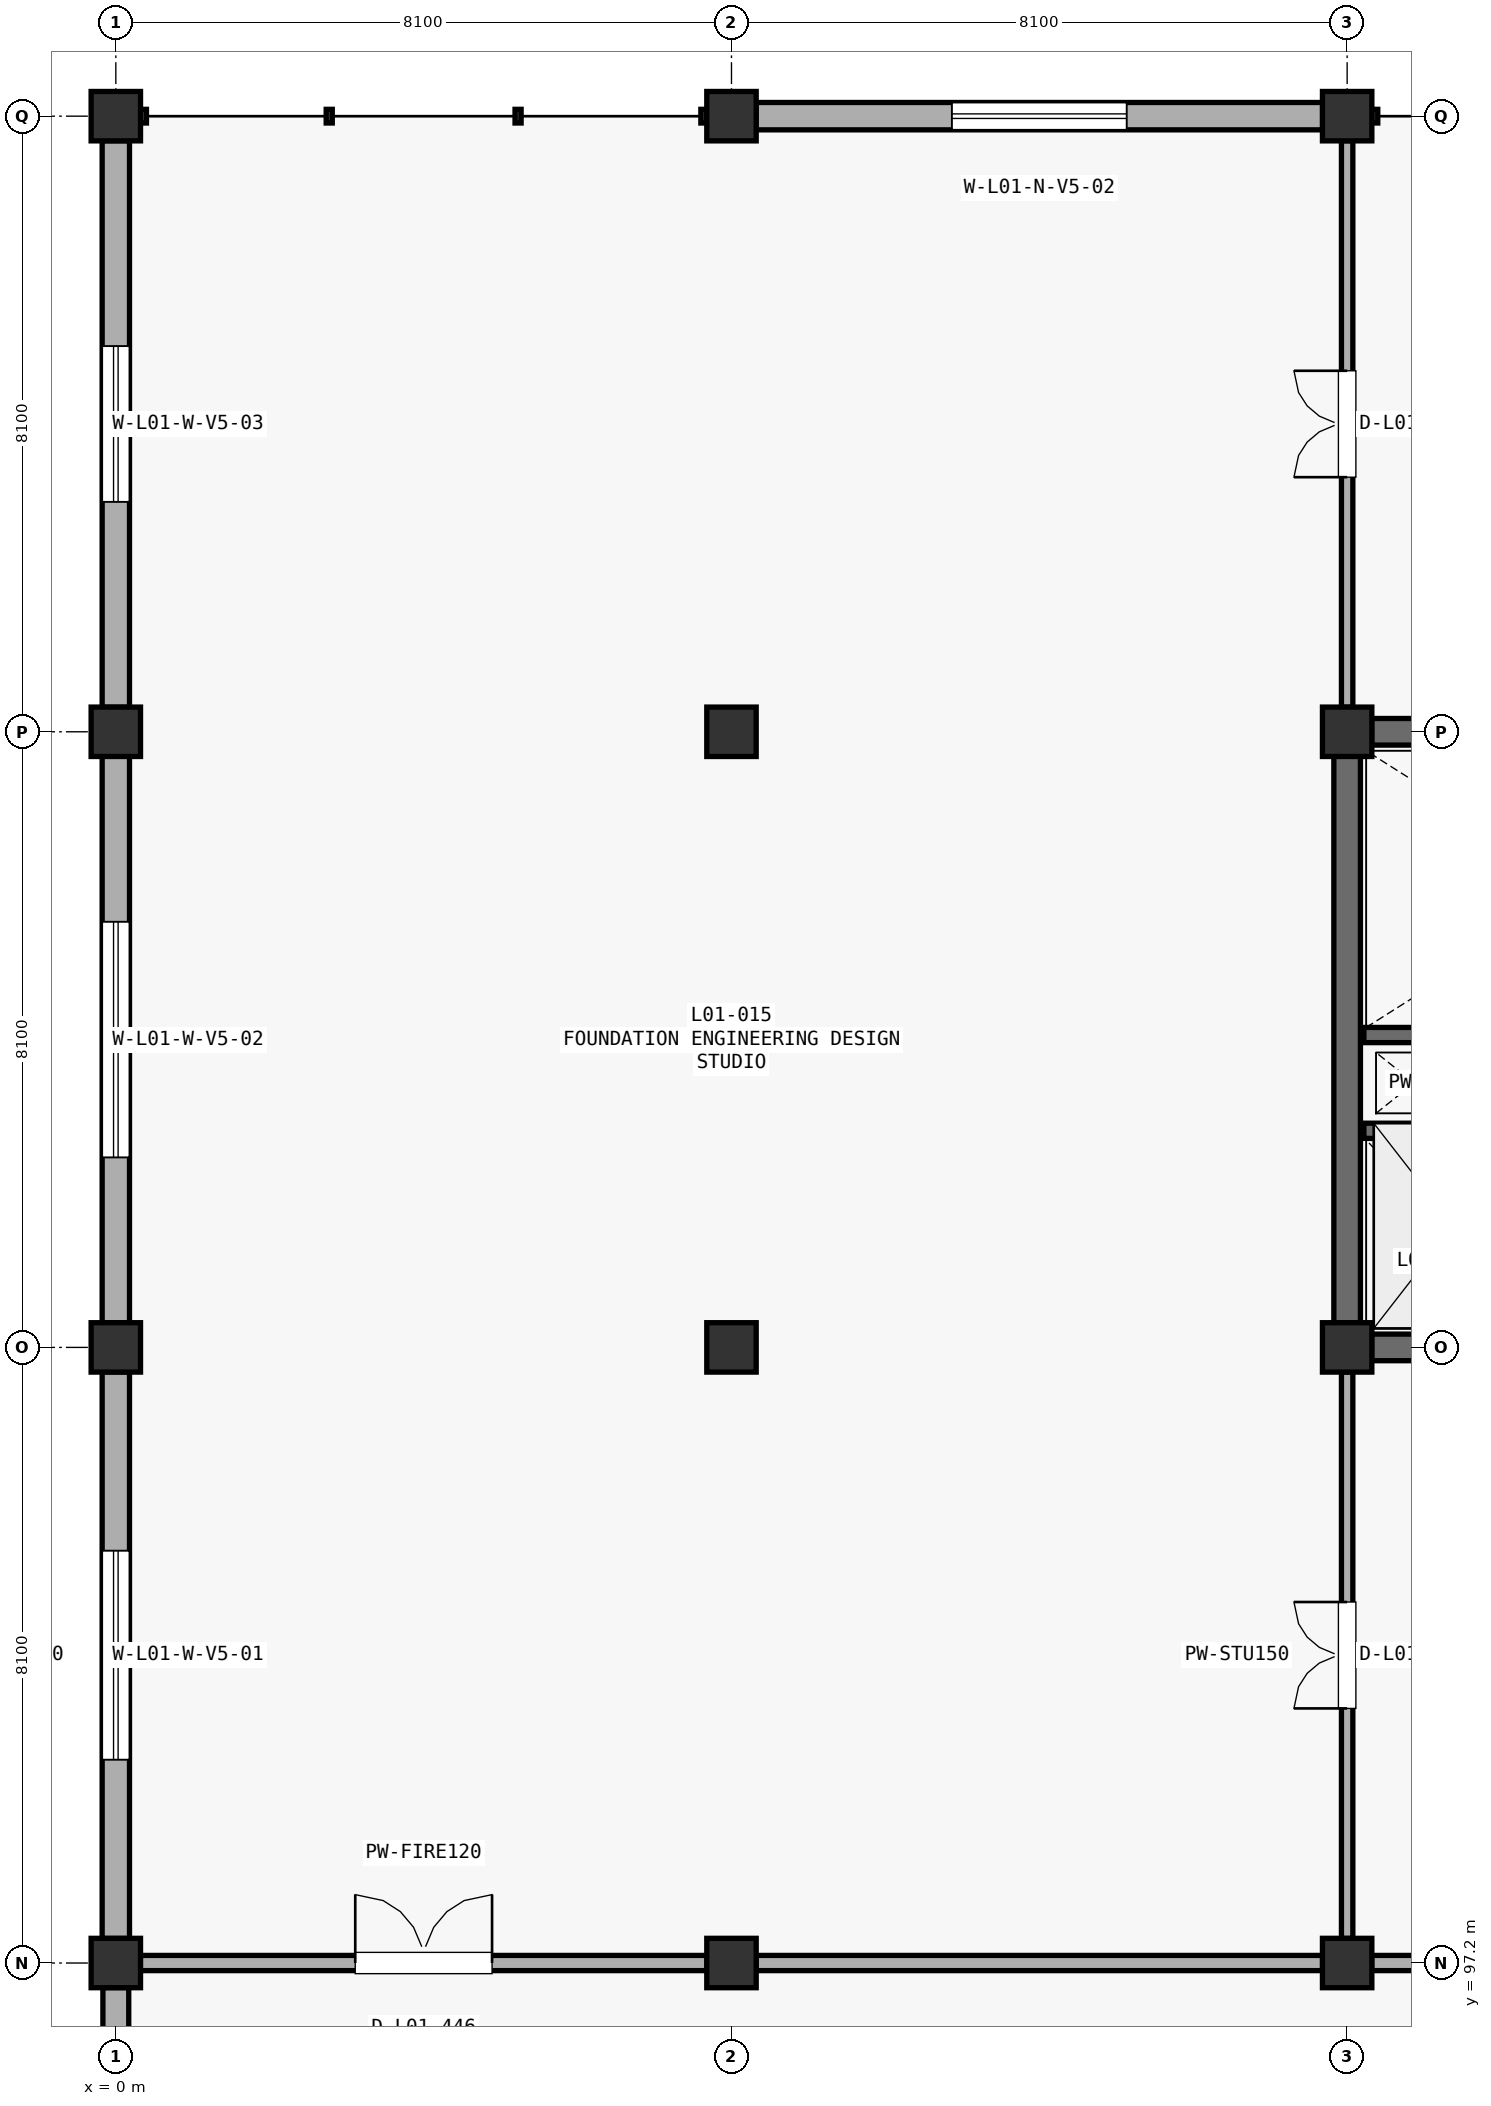
"""IFC4 building model, lengths in metres.
Left out: names, types, materials, properties, quantities, classifications, styles, units other than length and angle.
Written with IfcOpenShell. Run it as: python <this file> out.ifc"""

import sys

from ifc_helpers import new_model, si_unit, direction, frame, frame_2d, origin, origin_2d, place, context, subcontext, project, spatial, rectangle, extrude, element, fill, save


model = new_model("IFC4")
c1 = context("Model", 3, precision=1e-05, world=origin(), true_north=direction((0.0, 1.0)))
c2 = subcontext(c1, "Body", "Model", "MODEL_VIEW")
j1 = project(units=[si_unit("LENGTHUNIT", "METRE"), si_unit("PLANEANGLEUNIT", "RADIAN")], contexts=[c1])
p1 = place(None, origin())
s1 = spatial("IfcSite", under=j1, at=p1, CompositionType="ELEMENT")
p2 = place(p1, origin())
s2 = spatial("IfcBuilding", under=s1, at=p2, CompositionType="ELEMENT")
p3 = place(p2, frame((0.0, 0.0, 5.1)))
s3 = spatial("IfcBuildingStorey", under=s2, at=p3, CompositionType="ELEMENT", Elevation=5.1)
for number, where, z_axis, x_axis in (
    (1, (0.0, 97.2, 0.0), (0.0, 0.0, 1.0), (1.0, 0.0, 0.0)),
    (2, (0.0, 105.3, 0.0), (0.0, 0.0, 1.0), (1.0, 0.0, 0.0)),
    (3, (0.0, 113.4, 0.0), (0.0, 0.0, 1.0), (1.0, 0.0, 0.0)),
    (4, (0.0, 121.5, 0.0), (0.0, 0.0, 1.0), (1.0, 0.0, 0.0)),
    (5, (8.1, 97.2, 0.0), (0.0, 0.0, 1.0), (1.0, 0.0, 0.0)),
    (6, (8.1, 105.3, 0.0), (0.0, 0.0, 1.0), (1.0, 0.0, 0.0)),
    (7, (8.1, 113.4, 0.0), (0.0, 0.0, 1.0), (1.0, 0.0, 0.0)),
    (8, (8.1, 121.5, 0.0), (0.0, 0.0, 1.0), (1.0, 0.0, 0.0)),
    (9, (16.2, 97.2, 0.0), (0.0, 0.0, 1.0), (1.0, 0.0, 0.0)),
    (10, (16.2, 105.3, 0.0), (0.0, 0.0, 1.0), (1.0, 0.0, 0.0)),
    (11, (16.2, 113.4, 0.0), (0.0, 0.0, 1.0), (1.0, 0.0, 0.0)),
    (12, (16.2, 121.5, 0.0), (0.0, 0.0, 1.0), (1.0, 0.0, 0.0)),
):
    element("IfcColumn", number, at=place(p3, frame(where, z_axis=z_axis, x_axis=x_axis)), inside=s3, PredefinedType="COLUMN", context=c2, shape_type="SweptSolid", body=[
        extrude(rectangle(XDim=0.65, YDim=0.65, at=origin_2d()), origin(), (0.0, 0.0, 1.0), 4.59),
    ])
p4 = place(p3, frame((0.0, 89.323, 0.0), z_axis=(0.0, 0.0, 1.0), x_axis=(0.0, 1.0, 0.0)))
e13 = element("IfcWall", 13, at=p4, inside=s3, PredefinedType="STANDARD", context=c2, shape_type="SweptSolid", body=[
    extrude(rectangle(XDim=7.554, YDim=0.34, at=frame_2d((3.777, 0.0))), origin(), (0.0, 0.0, 1.0), 3.852),
])
p5 = place(p4, frame((2.727, 0.0, 1.25)))
e14 = element("IfcOpeningElement", 14, at=p5, cuts=e13, PredefinedType="OPENING", context=c2, shape_type="SweptSolid", body=[
    extrude(rectangle(XDim=2.1, YDim=1.5, at=frame_2d((1.05, 0.75))), frame((0.0, 0.18, 0.0), z_axis=(0.0, -1.0, 0.0), x_axis=(1.0, 0.0, 0.0)), (0.0, 0.0, 1.0), 0.36),
])
p6 = place(p3, frame((0.0, 97.523, 0.0), z_axis=(0.0, 0.0, 1.0), x_axis=(0.0, 1.0, 0.0)))
e15 = element("IfcWall", 15, at=p6, inside=s3, PredefinedType="STANDARD", context=c2, shape_type="SweptSolid", body=[
    extrude(rectangle(XDim=7.454, YDim=0.36, at=frame_2d((3.727, 0.0))), origin(), (0.0, 0.0, 1.0), 3.947),
])
p7 = place(p6, frame((2.352, 0.0, 0.85)))
e16 = element("IfcOpeningElement", 16, at=p7, cuts=e15, PredefinedType="OPENING", context=c2, shape_type="SweptSolid", body=[
    extrude(rectangle(XDim=2.75, YDim=1.7, at=frame_2d((1.375, 0.85))), frame((0.0, 0.19, 0.0), z_axis=(0.0, -1.0, 0.0), x_axis=(1.0, 0.0, 0.0)), (0.0, 0.0, 1.0), 0.38),
])
p8 = place(p3, frame((0.0, 105.623, 0.0), z_axis=(0.0, 0.0, 1.0), x_axis=(0.0, 1.0, 0.0)))
e17 = element("IfcWall", 17, at=p8, inside=s3, PredefinedType="STANDARD", context=c2, shape_type="SweptSolid", body=[
    extrude(rectangle(XDim=7.454, YDim=0.36, at=frame_2d((3.727, 0.0))), origin(), (0.0, 0.0, 1.0), 3.502),
])
p9 = place(p8, frame((2.177, 0.0, 0.85)))
e18 = element("IfcOpeningElement", 18, at=p9, cuts=e17, PredefinedType="OPENING", context=c2, shape_type="SweptSolid", body=[
    extrude(rectangle(XDim=3.1, YDim=1.7, at=frame_2d((1.55, 0.85))), frame((0.0, 0.19, 0.0), z_axis=(0.0, -1.0, 0.0), x_axis=(1.0, 0.0, 0.0)), (0.0, 0.0, 1.0), 0.38),
])
p10 = place(p3, frame((0.0, 113.723, 0.0), z_axis=(0.0, 0.0, 1.0), x_axis=(0.0, 1.0, 0.0)))
e19 = element("IfcWall", 19, at=p10, inside=s3, PredefinedType="STANDARD", context=c2, shape_type="SweptSolid", body=[
    extrude(rectangle(XDim=7.454, YDim=0.36, at=frame_2d((3.727, 0.0))), origin(), (0.0, 0.0, 1.0), 3.602),
])
p11 = place(p10, frame((2.702, 0.0, 0.85)))
e20 = element("IfcOpeningElement", 20, at=p11, cuts=e19, PredefinedType="OPENING", context=c2, shape_type="SweptSolid", body=[
    extrude(rectangle(XDim=2.05, YDim=1.6, at=frame_2d((1.025, 0.8))), frame((0.0, 0.19, 0.0), z_axis=(0.0, -1.0, 0.0), x_axis=(1.0, 0.0, 0.0)), (0.0, 0.0, 1.0), 0.38),
])
p12 = place(p3, frame((8.423, 121.5, 0.0), z_axis=(0.0, 0.0, 1.0), x_axis=(1.0, 0.0, 0.0)))
e21 = element("IfcWall", 21, at=p12, inside=s3, PredefinedType="STANDARD", context=c2, shape_type="SweptSolid", body=[
    extrude(rectangle(XDim=7.454, YDim=0.36, at=frame_2d((3.727, 0.0))), origin(), (0.0, 0.0, 1.0), 3.402),
])
p13 = place(p12, frame((2.577, 0.0, 0.85)))
e22 = element("IfcOpeningElement", 22, at=p13, cuts=e21, PredefinedType="OPENING", context=c2, shape_type="SweptSolid", body=[
    extrude(rectangle(XDim=2.3, YDim=1.6, at=frame_2d((1.15, 0.8))), frame((0.0, 0.19, 0.0), z_axis=(0.0, -1.0, 0.0), x_axis=(1.0, 0.0, 0.0)), (0.0, 0.0, 1.0), 0.38),
])
p14 = place(p3, frame((16.523, 113.4, 0.0), z_axis=(0.0, 0.0, 1.0), x_axis=(1.0, 0.0, 0.0)))
e23 = element("IfcWall", 23, at=p14, inside=s3, PredefinedType="SHEAR", context=c2, shape_type="SweptSolid", body=[
    extrude(rectangle(XDim=7.454, YDim=0.35, at=frame_2d((3.727, 0.0))), origin(), (0.0, 0.0, 1.0), 4.252),
])
p15 = place(p3, frame((16.2, 105.623, 0.0), z_axis=(0.0, 0.0, 1.0), x_axis=(0.0, 1.0, 0.0)))
e24 = element("IfcWall", 24, at=p15, inside=s3, PredefinedType="SHEAR", context=c2, shape_type="SweptSolid", body=[
    extrude(rectangle(XDim=7.454, YDim=0.35, at=frame_2d((3.727, 0.0))), origin(), (0.0, 0.0, 1.0), 4.252),
])
p16 = place(p3, frame((16.523, 105.3, 0.0), z_axis=(0.0, 0.0, 1.0), x_axis=(1.0, 0.0, 0.0)))
e25 = element("IfcWall", 25, at=p16, inside=s3, PredefinedType="SHEAR", context=c2, shape_type="SweptSolid", body=[
    extrude(rectangle(XDim=7.454, YDim=0.35, at=frame_2d((3.727, 0.0))), origin(), (0.0, 0.0, 1.0), 4.252),
])
p17 = place(p16, frame((5.204, 0.0, 0.0)))
e26 = element("IfcOpeningElement", 26, at=p17, cuts=e25, PredefinedType="OPENING", context=c2, shape_type="SweptSolid", body=[
    extrude(rectangle(XDim=1.2, YDim=2.2, at=frame_2d((0.6, 1.1))), frame((0.0, 0.185, 0.0), z_axis=(0.0, -1.0, 0.0), x_axis=(1.0, 0.0, 0.0)), (0.0, 0.0, 1.0), 0.37),
])
p18 = place(p3, frame((16.42, 109.41, 0.0), z_axis=(0.0, 0.0, 1.0), x_axis=(1.0, 0.0, 0.0)))
e27 = element("IfcWall", 27, at=p18, inside=s3, PredefinedType="SHEAR", context=c2, shape_type="SweptSolid", body=[
    extrude(rectangle(XDim=7.66, YDim=0.2, at=frame_2d((3.83, 0.0))), origin(), (0.0, 0.0, 1.0), 4.252),
])
p19 = place(p18, frame((6.11, 0.0, 0.0)))
e28 = element("IfcOpeningElement", 28, at=p19, cuts=e27, PredefinedType="OPENING", context=c2, shape_type="SweptSolid", body=[
    extrude(rectangle(XDim=1.15, YDim=2.2, at=frame_2d((0.575, 1.1))), frame((0.0, 0.11, 0.0), z_axis=(0.0, -1.0, 0.0), x_axis=(1.0, 0.0, 0.0)), (0.0, 0.0, 1.0), 0.22),
])
p20 = place(p3, frame((16.42, 108.15, 0.0), z_axis=(0.0, 0.0, 1.0), x_axis=(1.0, 0.0, 0.0)))
e29 = element("IfcWall", 29, at=p20, inside=s3, PredefinedType="SHEAR", context=c2, shape_type="SweptSolid", body=[
    extrude(rectangle(XDim=2.56, YDim=0.2, at=frame_2d((1.28, 0.0))), origin(), (0.0, 0.0, 1.0), 4.252),
])
p21 = place(p3, frame((0.323, 97.2, 0.0), z_axis=(0.0, 0.0, 1.0), x_axis=(1.0, 0.0, 0.0)))
e30 = element("IfcWall", 30, at=p21, inside=s3, PredefinedType="PARTITIONING", context=c2, shape_type="SweptSolid", body=[
    extrude(rectangle(XDim=7.454, YDim=0.2, at=frame_2d((3.727, 0.0))), origin(), (0.0, 0.0, 1.0), 3.302),
])
p22 = place(p21, frame((2.827, 0.0, 0.0)))
e31 = element("IfcOpeningElement", 31, at=p22, cuts=e30, PredefinedType="OPENING", context=c2, shape_type="SweptSolid", body=[
    extrude(rectangle(XDim=1.8, YDim=2.4, at=frame_2d((0.9, 1.2))), frame((0.0, 0.11, 0.0), z_axis=(0.0, -1.0, 0.0), x_axis=(1.0, 0.0, 0.0)), (0.0, 0.0, 1.0), 0.22),
])
p23 = place(p3, frame((8.423, 97.2, 0.0), z_axis=(0.0, 0.0, 1.0), x_axis=(1.0, 0.0, 0.0)))
e32 = element("IfcWall", 32, at=p23, inside=s3, PredefinedType="PARTITIONING", context=c2, shape_type="SweptSolid", body=[
    extrude(rectangle(XDim=7.454, YDim=0.2, at=frame_2d((3.727, 0.0))), origin(), (0.0, 0.0, 1.0), 3.502),
])
p24 = place(p3, frame((16.523, 97.2, 0.0), z_axis=(0.0, 0.0, 1.0), x_axis=(1.0, 0.0, 0.0)))
e33 = element("IfcWall", 33, at=p24, inside=s3, PredefinedType="PARTITIONING", context=c2, shape_type="SweptSolid", body=[
    extrude(rectangle(XDim=7.454, YDim=0.2, at=frame_2d((3.727, 0.0))), origin(), (0.0, 0.0, 1.0), 3.602),
])
p25 = place(p3, frame((16.2, 97.523, 0.0), z_axis=(0.0, 0.0, 1.0), x_axis=(0.0, 1.0, 0.0)))
e34 = element("IfcWall", 34, at=p25, inside=s3, PredefinedType="PARTITIONING", context=c2, shape_type="SweptSolid", body=[
    extrude(rectangle(XDim=7.454, YDim=0.15, at=frame_2d((3.727, 0.0))), origin(), (0.0, 0.0, 1.0), 3.402),
])
p26 = place(p25, frame((3.027, 0.0, 0.0)))
e35 = element("IfcOpeningElement", 35, at=p26, cuts=e34, PredefinedType="OPENING", context=c2, shape_type="SweptSolid", body=[
    extrude(rectangle(XDim=1.4, YDim=2.2, at=frame_2d((0.7, 1.1))), frame((0.0, 0.085, 0.0), z_axis=(0.0, -1.0, 0.0), x_axis=(1.0, 0.0, 0.0)), (0.0, 0.0, 1.0), 0.17),
])
p27 = place(p3, frame((16.2, 113.723, 0.0), z_axis=(0.0, 0.0, 1.0), x_axis=(0.0, 1.0, 0.0)))
e36 = element("IfcWall", 36, at=p27, inside=s3, PredefinedType="PARTITIONING", context=c2, shape_type="SweptSolid", body=[
    extrude(rectangle(XDim=7.454, YDim=0.15, at=frame_2d((3.727, 0.0))), origin(), (0.0, 0.0, 1.0), 3.502),
])
p28 = place(p27, frame((3.027, 0.0, 0.0)))
e37 = element("IfcOpeningElement", 37, at=p28, cuts=e36, PredefinedType="OPENING", context=c2, shape_type="SweptSolid", body=[
    extrude(rectangle(XDim=1.4, YDim=2.2, at=frame_2d((0.7, 1.1))), frame((0.0, 0.085, 0.0), z_axis=(0.0, -1.0, 0.0), x_axis=(1.0, 0.0, 0.0)), (0.0, 0.0, 1.0), 0.17),
])
p29 = place(p7, origin())
e38 = element("IfcWindow", 38, at=p29, inside=s3, PartitioningType="SINGLE_PANEL", PredefinedType="WINDOW", context=c2, shape_type="SweptSolid", body=[
    extrude(rectangle(XDim=2.75, YDim=1.7, at=frame_2d((1.375, 0.85))), frame((0.0, 0.03, 0.0), z_axis=(0.0, -1.0, 0.0), x_axis=(1.0, 0.0, 0.0)), (0.0, 0.0, 1.0), 0.06),
])
fill(e16, e38)
p30 = place(p9, origin())
e39 = element("IfcWindow", 39, at=p30, inside=s3, PartitioningType="SINGLE_PANEL", PredefinedType="WINDOW", context=c2, shape_type="SweptSolid", body=[
    extrude(rectangle(XDim=3.1, YDim=1.7, at=frame_2d((1.55, 0.85))), frame((0.0, 0.03, 0.0), z_axis=(0.0, -1.0, 0.0), x_axis=(1.0, 0.0, 0.0)), (0.0, 0.0, 1.0), 0.06),
])
fill(e18, e39)
p31 = place(p11, origin())
e40 = element("IfcWindow", 40, at=p31, inside=s3, PartitioningType="SINGLE_PANEL", PredefinedType="WINDOW", context=c2, shape_type="SweptSolid", body=[
    extrude(rectangle(XDim=2.05, YDim=1.6, at=frame_2d((1.025, 0.8))), frame((0.0, 0.03, 0.0), z_axis=(0.0, -1.0, 0.0), x_axis=(1.0, 0.0, 0.0)), (0.0, 0.0, 1.0), 0.06),
])
fill(e20, e40)
p32 = place(p13, origin())
e41 = element("IfcWindow", 41, at=p32, inside=s3, PartitioningType="SINGLE_PANEL", PredefinedType="WINDOW", context=c2, shape_type="SweptSolid", body=[
    extrude(rectangle(XDim=2.3, YDim=1.6, at=frame_2d((1.15, 0.8))), frame((0.0, 0.03, 0.0), z_axis=(0.0, -1.0, 0.0), x_axis=(1.0, 0.0, 0.0)), (0.0, 0.0, 1.0), 0.06),
])
fill(e22, e41)
p33 = place(p22, origin())
e42 = element("IfcDoor", 42, at=p33, inside=s3, OperationType="DOUBLE_SWING_LEFT", PredefinedType="DOOR", context=c2, shape_type="SweptSolid", body=[
    extrude(rectangle(XDim=1.8, YDim=2.4, at=frame_2d((0.9, 1.2))), frame((0.0, 0.025, 0.0), z_axis=(0.0, -1.0, 0.0), x_axis=(1.0, 0.0, 0.0)), (0.0, 0.0, 1.0), 0.05),
])
fill(e31, e42)
p34 = place(p26, origin())
e43 = element("IfcDoor", 43, at=p34, inside=s3, OperationType="DOUBLE_SWING_LEFT", PredefinedType="DOOR", context=c2, shape_type="SweptSolid", body=[
    extrude(rectangle(XDim=1.4, YDim=2.2, at=frame_2d((0.7, 1.1))), frame((0.0, 0.025, 0.0), z_axis=(0.0, -1.0, 0.0), x_axis=(1.0, 0.0, 0.0)), (0.0, 0.0, 1.0), 0.05),
])
fill(e35, e43)
p35 = place(p28, origin())
e44 = element("IfcDoor", 44, at=p35, inside=s3, OperationType="DOUBLE_SWING_LEFT", PredefinedType="DOOR", context=c2, shape_type="SweptSolid", body=[
    extrude(rectangle(XDim=1.4, YDim=2.2, at=frame_2d((0.7, 1.1))), frame((0.0, 0.025, 0.0), z_axis=(0.0, -1.0, 0.0), x_axis=(1.0, 0.0, 0.0)), (0.0, 0.0, 1.0), 0.05),
])
fill(e37, e44)
save(model, sys.argv[1])
